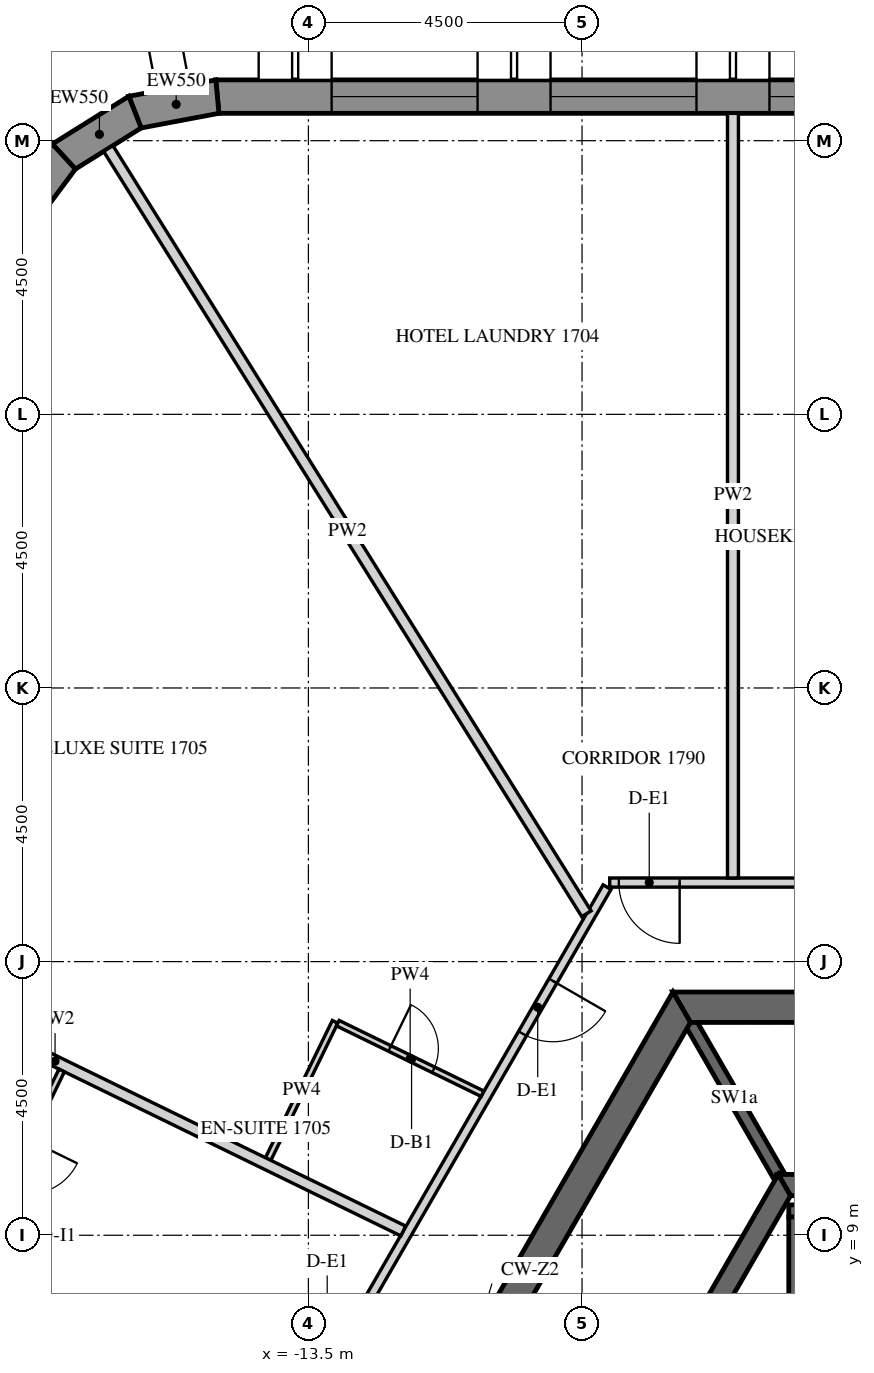
"""IFC4 building model, lengths in metres.
Left out: names, types, materials, properties, quantities, classifications, styles, units other than length and angle.
Written with IfcOpenShell. Run it as: python <this file> out.ifc"""

import sys

from ifc_helpers import new_model, si_unit, direction, frame, frame_2d, origin, place, context, subcontext, project, spatial, polyline, rectangle, outline, extrude, element, fill, save


model = new_model("IFC4")
c1 = context("Model", 3, precision=1e-05, world=origin(), true_north=direction((0.0, 1.0)))
c2 = subcontext(c1, "Body", "Model", "MODEL_VIEW")
j1 = project(units=[si_unit("LENGTHUNIT", "METRE"), si_unit("PLANEANGLEUNIT", "RADIAN")], contexts=[c1])
p1 = place(None, origin())
s1 = spatial("IfcSite", under=j1, at=p1, CompositionType="ELEMENT")
p2 = place(p1, origin())
s2 = spatial("IfcBuilding", under=s1, at=p2, CompositionType="ELEMENT")
p3 = place(p2, frame((0.0, 0.0, 215.1)))
s3 = spatial("IfcBuildingStorey", under=s2, at=p3, CompositionType="ELEMENT", Elevation=215.1)
p4 = place(p3, frame((12.761, 27.725, -0.15), z_axis=(0.0, 0.0, 1.0), x_axis=(-1.0, 0.0, 0.0)))
e1 = element("IfcWall", 1, at=p4, inside=s3, PredefinedType="SOLIDWALL", context=c2, shape_type="SweptSolid", body=[
    extrude(outline(polyline([(-0.022, -0.275), (27.783, -0.275), (27.732, 0.275), (0.022, 0.275), (-0.022, -0.275)])), origin(), (0.0, 0.0, 1.0), 3.9),
])
p5 = place(p4, frame((1.879, 0.0, 1.05)))
e2 = element("IfcOpeningElement", 2, at=p5, cuts=e1, PredefinedType="OPENING", context=c2, shape_type="SweptSolid", body=[
    extrude(rectangle(XDim=2.4, YDim=2.4, at=frame_2d((1.2, 1.2))), frame((0.0, 0.285, 0.0), z_axis=(0.0, -1.0, 0.0), x_axis=(1.0, 0.0, 0.0)), (0.0, 0.0, 1.0), 0.57),
])
p6 = place(p4, frame((5.479, 0.0, 1.05)))
e3 = element("IfcOpeningElement", 3, at=p6, cuts=e1, PredefinedType="OPENING", context=c2, shape_type="SweptSolid", body=[
    extrude(rectangle(XDim=2.4, YDim=2.4, at=frame_2d((1.2, 1.2))), frame((0.0, 0.285, 0.0), z_axis=(0.0, -1.0, 0.0), x_axis=(1.0, 0.0, 0.0)), (0.0, 0.0, 1.0), 0.57),
])
p7 = place(p4, frame((9.079, 0.0, 1.05)))
e4 = element("IfcOpeningElement", 4, at=p7, cuts=e1, PredefinedType="OPENING", context=c2, shape_type="SweptSolid", body=[
    extrude(rectangle(XDim=2.4, YDim=2.4, at=frame_2d((1.2, 1.2))), frame((0.0, 0.285, 0.0), z_axis=(0.0, -1.0, 0.0), x_axis=(1.0, 0.0, 0.0)), (0.0, 0.0, 1.0), 0.57),
])
p8 = place(p4, frame((12.679, 0.0, 1.05)))
e5 = element("IfcOpeningElement", 5, at=p8, cuts=e1, PredefinedType="OPENING", context=c2, shape_type="SweptSolid", body=[
    extrude(rectangle(XDim=2.4, YDim=2.4, at=frame_2d((1.2, 1.2))), frame((0.0, 0.285, 0.0), z_axis=(0.0, -1.0, 0.0), x_axis=(1.0, 0.0, 0.0)), (0.0, 0.0, 1.0), 0.57),
])
p9 = place(p4, frame((16.279, 0.0, 1.05)))
e6 = element("IfcOpeningElement", 6, at=p9, cuts=e1, PredefinedType="OPENING", context=c2, shape_type="SweptSolid", body=[
    extrude(rectangle(XDim=2.4, YDim=2.4, at=frame_2d((1.2, 1.2))), frame((0.0, 0.285, 0.0), z_axis=(0.0, -1.0, 0.0), x_axis=(1.0, 0.0, 0.0)), (0.0, 0.0, 1.0), 0.57),
])
p10 = place(p4, frame((19.879, 0.0, 1.05)))
e7 = element("IfcOpeningElement", 7, at=p10, cuts=e1, PredefinedType="OPENING", context=c2, shape_type="SweptSolid", body=[
    extrude(rectangle(XDim=2.4, YDim=2.4, at=frame_2d((1.2, 1.2))), frame((0.0, 0.285, 0.0), z_axis=(0.0, -1.0, 0.0), x_axis=(1.0, 0.0, 0.0)), (0.0, 0.0, 1.0), 0.57),
])
p11 = place(p4, frame((23.479, 0.0, 1.05)))
e8 = element("IfcOpeningElement", 8, at=p11, cuts=e1, PredefinedType="OPENING", context=c2, shape_type="SweptSolid", body=[
    extrude(rectangle(XDim=2.4, YDim=2.4, at=frame_2d((1.2, 1.2))), frame((0.0, 0.285, 0.0), z_axis=(0.0, -1.0, 0.0), x_axis=(1.0, 0.0, 0.0)), (0.0, 0.0, 1.0), 0.57),
])
p12 = place(p3, frame((-14.997, 27.725, -0.15), z_axis=(0.0, 0.0, 1.0), x_axis=(-0.982705443133, -0.185175624845, 0.0)))
e9 = element("IfcWall", 9, at=p12, inside=s3, PredefinedType="SOLIDWALL", context=c2, shape_type="SweptSolid", body=[
    extrude(outline(polyline([(-0.026, -0.275), (1.431, -0.275), (1.327, 0.275), (0.026, 0.275), (-0.026, -0.275)])), origin(), (0.0, 0.0, 1.0), 3.9),
])
p13 = place(p3, frame((-16.352, 27.47, -0.15), z_axis=(0.0, 0.0, 1.0), x_axis=(-0.848057977594, -0.5299034503, 0.0)))
e10 = element("IfcWall", 10, at=p13, inside=s3, PredefinedType="SOLIDWALL", context=c2, shape_type="SweptSolid", body=[
    extrude(outline(polyline([(-0.052, -0.275), (1.431, -0.275), (1.327, 0.275), (0.052, 0.275), (-0.052, -0.275)])), origin(), (0.0, 0.0, 1.0), 3.9),
])
p14 = place(p3, frame((-17.521, 26.739, -0.15), z_axis=(0.0, 0.0, 1.0), x_axis=(-0.597135295884, -0.802140535324, 0.0)))
e11 = element("IfcWall", 11, at=p14, inside=s3, PredefinedType="SOLIDWALL", context=c2, shape_type="SweptSolid", body=[
    extrude(outline(polyline([(-0.052, -0.275), (1.405, -0.275), (1.354, 0.275), (0.052, 0.275), (-0.052, -0.275)])), origin(), (0.0, 0.0, 1.0), 3.9),
])
p15 = place(p3, frame((-7.361, 12.75, -0.15), z_axis=(0.0, 0.0, 1.0), x_axis=(-0.50000571537, -0.866022103989, 0.0)))
e12 = element("IfcWall", 12, at=p15, inside=s3, PredefinedType="SHEAR", context=c2, shape_type="SweptSolid", body=[
    extrude(outline(polyline([(-0.144, -0.25), (14.867, -0.25), (14.578, 0.25), (0.144, 0.25), (-0.144, -0.25)])), origin(), (0.0, 0.0, 1.0), 3.9),
])
p16 = place(p15, frame((6.49, 0.0, 0.15)))
e13 = element("IfcOpeningElement", 13, at=p16, cuts=e12, PredefinedType="OPENING", context=c2, shape_type="SweptSolid", body=[
    extrude(rectangle(XDim=1.8, YDim=2.4, at=frame_2d((0.9, 1.2))), frame((0.0, 0.26, 0.0), z_axis=(0.0, -1.0, 0.0), x_axis=(1.0, 0.0, 0.0)), (0.0, 0.0, 1.0), 0.52),
])
p17 = place(p3, frame((7.361, 12.75, -0.15), z_axis=(0.0, 0.0, 1.0), x_axis=(-1.0, 0.0, 0.0)))
e14 = element("IfcWall", 14, at=p17, inside=s3, PredefinedType="SHEAR", context=c2, shape_type="SweptSolid", body=[
    extrude(outline(polyline([(-0.144, -0.25), (14.866, -0.25), (14.578, 0.25), (0.144, 0.25), (-0.144, -0.25)])), origin(), (0.0, 0.0, 1.0), 3.9),
])
p18 = place(p17, frame((6.761, 0.0, 0.15)))
e15 = element("IfcOpeningElement", 15, at=p18, cuts=e14, PredefinedType="OPENING", context=c2, shape_type="SweptSolid", body=[
    extrude(rectangle(XDim=1.2, YDim=2.4, at=frame_2d((0.6, 1.2))), frame((0.0, 0.26, 0.0), z_axis=(0.0, -1.0, 0.0), x_axis=(1.0, 0.0, 0.0)), (0.0, 0.0, 1.0), 0.52),
])
p19 = place(p3, frame((-5.673, 9.825, -0.15), z_axis=(0.0, 0.0, 1.0), x_axis=(-0.499995046907, -0.866028263435, 0.0)))
e16 = element("IfcWall", 16, at=p19, inside=s3, PredefinedType="SHEAR", context=c2, shape_type="SweptSolid", body=[
    extrude(outline(polyline([(-0.101, -0.175), (11.446, -0.175), (11.244, 0.175), (0.101, 0.175), (-0.101, -0.175)])), origin(), (0.0, 0.0, 1.0), 3.9),
])
p20 = place(p19, frame((4.801, 0.0, 0.15)))
e17 = element("IfcOpeningElement", 17, at=p20, cuts=e16, PredefinedType="OPENING", context=c2, shape_type="SweptSolid", body=[
    extrude(rectangle(XDim=1.8, YDim=2.4, at=frame_2d((0.9, 1.2))), frame((0.0, 0.185, 0.0), z_axis=(0.0, -1.0, 0.0), x_axis=(1.0, 0.0, 0.0)), (0.0, 0.0, 1.0), 0.37),
])
p21 = place(p3, frame((5.673, 9.825, -0.15), z_axis=(0.0, 0.0, 1.0), x_axis=(-1.0, 0.0, 0.0)))
e18 = element("IfcWall", 18, at=p21, inside=s3, PredefinedType="SHEAR", context=c2, shape_type="SweptSolid", body=[
    extrude(outline(polyline([(-0.101, -0.175), (11.446, -0.175), (11.244, 0.175), (0.101, 0.175), (-0.101, -0.175)])), origin(), (0.0, 0.0, 1.0), 3.9),
])
p22 = place(p3, frame((-5.6, 9.4, -0.25), z_axis=(0.0, 0.0, 1.0), x_axis=(1.0, 0.0, 0.0)))
e19 = element("IfcWall", 19, at=p22, inside=s3, PredefinedType="SHEAR", context=c2, shape_type="SweptSolid", body=[
    extrude(rectangle(XDim=11.2, YDim=0.2, at=frame_2d((5.6, 0.0))), origin(), (0.0, 0.0, 1.0), 3.9),
])
p23 = place(p3, frame((-5.5, 6.4, -0.25), z_axis=(0.0, 0.0, 1.0), x_axis=(0.0, 1.0, 0.0)))
e20 = element("IfcWall", 20, at=p23, inside=s3, PredefinedType="SHEAR", context=c2, shape_type="SweptSolid", body=[
    extrude(rectangle(XDim=2.9, YDim=0.2, at=frame_2d((1.45, 0.0))), origin(), (0.0, 0.0, 1.0), 3.9),
])
p24 = place(p3, frame((-5.773, 10.0, -0.15), z_axis=(0.0, 0.0, 1.0), x_axis=(-0.499995765644, 0.866027848477, 0.0)))
e21 = element("IfcWall", 21, at=p24, inside=s3, PredefinedType="SHEAR", context=c2, shape_type="SweptSolid", body=[
    extrude(rectangle(XDim=2.887, YDim=0.2, at=frame_2d((1.443, 0.0))), origin(), (0.0, 0.0, 1.0), 3.9),
])
p25 = place(p3, frame((6.091, 14.8, 0.0), z_axis=(0.0, 0.0, 1.0), x_axis=(-1.0, 0.0, 0.0)))
e22 = element("IfcWall", 22, at=p25, inside=s3, PredefinedType="PARTITIONING", context=c2, shape_type="SweptSolid", body=[
    extrude(rectangle(XDim=14.636, YDim=0.15, at=frame_2d((7.318, 0.0))), origin(), (0.0, 0.0, 1.0), 2.988),
])
p26 = place(p25, frame((0.761, 0.0, 0.0)))
e23 = element("IfcOpeningElement", 23, at=p26, cuts=e22, PredefinedType="OPENING", context=c2, shape_type="SweptSolid", body=[
    extrude(rectangle(XDim=1.0, YDim=2.1, at=frame_2d((0.5, 1.05))), frame((0.0, 0.085, 0.0), z_axis=(0.0, -1.0, 0.0), x_axis=(1.0, 0.0, 0.0)), (0.0, 0.0, 1.0), 0.17),
])
p27 = place(p25, frame((6.709, 0.0, 0.0)))
e24 = element("IfcOpeningElement", 24, at=p27, cuts=e22, PredefinedType="OPENING", context=c2, shape_type="SweptSolid", body=[
    extrude(rectangle(XDim=1.0, YDim=2.1, at=frame_2d((0.5, 1.05))), frame((0.0, 0.085, 0.0), z_axis=(0.0, -1.0, 0.0), x_axis=(1.0, 0.0, 0.0)), (0.0, 0.0, 1.0), 0.17),
])
p28 = place(p25, frame((10.309, 0.0, 0.0)))
e25 = element("IfcOpeningElement", 25, at=p28, cuts=e22, PredefinedType="OPENING", context=c2, shape_type="SweptSolid", body=[
    extrude(rectangle(XDim=1.0, YDim=2.1, at=frame_2d((0.5, 1.05))), frame((0.0, 0.085, 0.0), z_axis=(0.0, -1.0, 0.0), x_axis=(1.0, 0.0, 0.0)), (0.0, 0.0, 1.0), 0.17),
])
p29 = place(p25, frame((13.486, 0.0, 0.0)))
e26 = element("IfcOpeningElement", 26, at=p29, cuts=e22, PredefinedType="OPENING", context=c2, shape_type="SweptSolid", body=[
    extrude(rectangle(XDim=1.0, YDim=2.1, at=frame_2d((0.5, 1.05))), frame((0.0, 0.085, 0.0), z_axis=(0.0, -1.0, 0.0), x_axis=(1.0, 0.0, 0.0)), (0.0, 0.0, 1.0), 0.17),
])
p30 = place(p3, frame((-8.588, 14.725, 0.0), z_axis=(0.0, 0.0, 1.0), x_axis=(-0.499999403554, -0.866025748143, 0.0)))
e27 = element("IfcWall", 27, at=p30, inside=s3, PredefinedType="PARTITIONING", context=c2, shape_type="SweptSolid", body=[
    extrude(rectangle(XDim=14.549, YDim=0.15, at=frame_2d((7.275, 0.0))), origin(), (0.0, 0.0, 1.0), 2.988),
])
p31 = place(p30, frame((1.781, 0.0, 0.0)))
e28 = element("IfcOpeningElement", 28, at=p31, cuts=e27, PredefinedType="OPENING", context=c2, shape_type="SweptSolid", body=[
    extrude(rectangle(XDim=1.0, YDim=2.1, at=frame_2d((0.5, 1.05))), frame((0.0, 0.085, 0.0), z_axis=(0.0, -1.0, 0.0), x_axis=(1.0, 0.0, 0.0)), (0.0, 0.0, 1.0), 0.17),
])
p32 = place(p30, frame((8.705, 0.0, 0.0)))
e29 = element("IfcOpeningElement", 29, at=p32, cuts=e27, PredefinedType="OPENING", context=c2, shape_type="SweptSolid", body=[
    extrude(rectangle(XDim=1.0, YDim=2.1, at=frame_2d((0.5, 1.05))), frame((0.0, 0.085, 0.0), z_axis=(0.0, -1.0, 0.0), x_axis=(1.0, 0.0, 0.0)), (0.0, 0.0, 1.0), 0.17),
])
p33 = place(p3, frame((-6.518, 27.45, 0.0), z_axis=(0.0, 0.0, 1.0), x_axis=(0.0, -1.0, 0.0)))
e30 = element("IfcWall", 30, at=p33, inside=s3, PredefinedType="PARTITIONING", context=c2, shape_type="SweptSolid", body=[
    extrude(rectangle(XDim=12.575, YDim=0.18, at=frame_2d((6.288, 0.0))), origin(), (0.0, 0.0, 1.0), 2.988),
])
p34 = place(p3, frame((-16.791, 26.871, 0.0), z_axis=(0.0, 0.0, 1.0), x_axis=(0.529927950822, -0.848042668111, 0.0)))
e31 = element("IfcWall", 31, at=p34, inside=s3, PredefinedType="PARTITIONING", context=c2, shape_type="SweptSolid", body=[
    extrude(rectangle(XDim=14.839, YDim=0.18, at=frame_2d((7.419, 0.0))), origin(), (0.0, 0.0, 1.0), 2.988),
])
p35 = place(p3, frame((-14.162, 10.254, 0.0), z_axis=(0.0, 0.0, 1.0), x_axis=(0.438398718232, 0.898780598284, 0.0)))
e32 = element("IfcWall", 32, at=p35, inside=s3, PredefinedType="PARTITIONING", context=c2, shape_type="SweptSolid", body=[
    extrude(rectangle(XDim=2.51, YDim=0.1, at=frame_2d((1.255, 0.0))), origin(), (0.0, 0.0, 1.0), 2.988),
])
p36 = place(p3, frame((-13.017, 12.488, 0.0), z_axis=(0.0, 0.0, 1.0), x_axis=(0.89882691906, -0.438303741226, 0.0)))
e33 = element("IfcWall", 33, at=p36, inside=s3, PredefinedType="PARTITIONING", context=c2, shape_type="SweptSolid", body=[
    extrude(rectangle(XDim=2.648, YDim=0.1, at=frame_2d((1.324, 0.0))), origin(), (0.0, 0.0, 1.0), 2.988),
])
p37 = place(p36, frame((0.95, 0.0, 0.0)))
e34 = element("IfcOpeningElement", 34, at=p37, cuts=e33, PredefinedType="OPENING", context=c2, shape_type="SweptSolid", body=[
    extrude(rectangle(XDim=0.8, YDim=2.1, at=frame_2d((0.4, 1.05))), frame((0.0, 0.06, 0.0), z_axis=(0.0, -1.0, 0.0), x_axis=(1.0, 0.0, 0.0)), (0.0, 0.0, 1.0), 0.12),
])
p38 = place(p3, frame((-23.393, 14.656, 0.0), z_axis=(0.0, 0.0, 1.0), x_axis=(0.898790356386, -0.438378712152, 0.0)))
e35 = element("IfcWall", 35, at=p38, inside=s3, PredefinedType="PARTITIONING", context=c2, shape_type="SweptSolid", body=[
    extrude(rectangle(XDim=12.743, YDim=0.18, at=frame_2d((6.372, 0.0))), origin(), (0.0, 0.0, 1.0), 2.988),
])
p39 = place(p3, frame((-17.557, 11.71, 0.0), z_axis=(0.0, 0.0, 1.0), x_axis=(-0.438400335718, -0.898779809321, 0.0)))
e36 = element("IfcWall", 36, at=p39, inside=s3, PredefinedType="PARTITIONING", context=c2, shape_type="SweptSolid", body=[
    extrude(rectangle(XDim=3.51, YDim=0.1, at=frame_2d((1.755, 0.0))), origin(), (0.0, 0.0, 1.0), 2.988),
])
p40 = place(p39, frame((1.26, 0.0, 0.0)))
e37 = element("IfcOpeningElement", 37, at=p40, cuts=e36, PredefinedType="OPENING", context=c2, shape_type="SweptSolid", body=[
    extrude(rectangle(XDim=0.9, YDim=2.1, at=frame_2d((0.45, 1.05))), frame((0.0, 0.06, 0.0), z_axis=(0.0, -1.0, 0.0), x_axis=(1.0, 0.0, 0.0)), (0.0, 0.0, 1.0), 0.12),
])
p41 = place(p9, frame((0.0, 0.205, 0.0)))
e38 = element("IfcWindow", 38, at=p41, inside=s3, PartitioningType="DOUBLE_PANEL_VERTICAL", PredefinedType="WINDOW", context=c2, shape_type="SweptSolid", body=[
    extrude(rectangle(XDim=2.4, YDim=2.4, at=frame_2d((1.2, 1.2))), frame((0.0, 0.03, 0.0), z_axis=(0.0, -1.0, 0.0), x_axis=(1.0, 0.0, 0.0)), (0.0, 0.0, 1.0), 0.06),
])
fill(e6, e38)
p42 = place(p10, frame((0.0, 0.205, 0.0)))
e39 = element("IfcWindow", 39, at=p42, inside=s3, PartitioningType="DOUBLE_PANEL_VERTICAL", PredefinedType="WINDOW", context=c2, shape_type="SweptSolid", body=[
    extrude(rectangle(XDim=2.4, YDim=2.4, at=frame_2d((1.2, 1.2))), frame((0.0, 0.03, 0.0), z_axis=(0.0, -1.0, 0.0), x_axis=(1.0, 0.0, 0.0)), (0.0, 0.0, 1.0), 0.06),
])
fill(e7, e39)
p43 = place(p11, frame((0.0, 0.205, 0.0)))
e40 = element("IfcWindow", 40, at=p43, inside=s3, PartitioningType="DOUBLE_PANEL_VERTICAL", PredefinedType="WINDOW", context=c2, shape_type="SweptSolid", body=[
    extrude(rectangle(XDim=2.4, YDim=2.4, at=frame_2d((1.2, 1.2))), frame((0.0, 0.03, 0.0), z_axis=(0.0, -1.0, 0.0), x_axis=(1.0, 0.0, 0.0)), (0.0, 0.0, 1.0), 0.06),
])
fill(e8, e40)
p44 = place(p29, origin())
e41 = element("IfcDoor", 41, at=p44, inside=s3, OperationType="SINGLE_SWING_LEFT", PredefinedType="DOOR", context=c2, shape_type="SweptSolid", body=[
    extrude(rectangle(XDim=1.0, YDim=2.1, at=frame_2d((0.5, 1.05))), frame((0.0, 0.025, 0.0), z_axis=(0.0, -1.0, 0.0), x_axis=(1.0, 0.0, 0.0)), (0.0, 0.0, 1.0), 0.05),
])
fill(e26, e41)
p45 = place(p31, origin())
e42 = element("IfcDoor", 42, at=p45, inside=s3, OperationType="SINGLE_SWING_LEFT", PredefinedType="DOOR", context=c2, shape_type="SweptSolid", body=[
    extrude(rectangle(XDim=1.0, YDim=2.1, at=frame_2d((0.5, 1.05))), frame((0.0, 0.025, 0.0), z_axis=(0.0, -1.0, 0.0), x_axis=(1.0, 0.0, 0.0)), (0.0, 0.0, 1.0), 0.05),
])
fill(e28, e42)
p46 = place(p37, origin())
e43 = element("IfcDoor", 43, at=p46, inside=s3, OperationType="SINGLE_SWING_LEFT", PredefinedType="DOOR", context=c2, shape_type="SweptSolid", body=[
    extrude(rectangle(XDim=0.8, YDim=2.1, at=frame_2d((0.4, 1.05))), frame((0.0, 0.025, 0.0), z_axis=(0.0, -1.0, 0.0), x_axis=(1.0, 0.0, 0.0)), (0.0, 0.0, 1.0), 0.05),
])
fill(e34, e43)
save(model, sys.argv[1])
